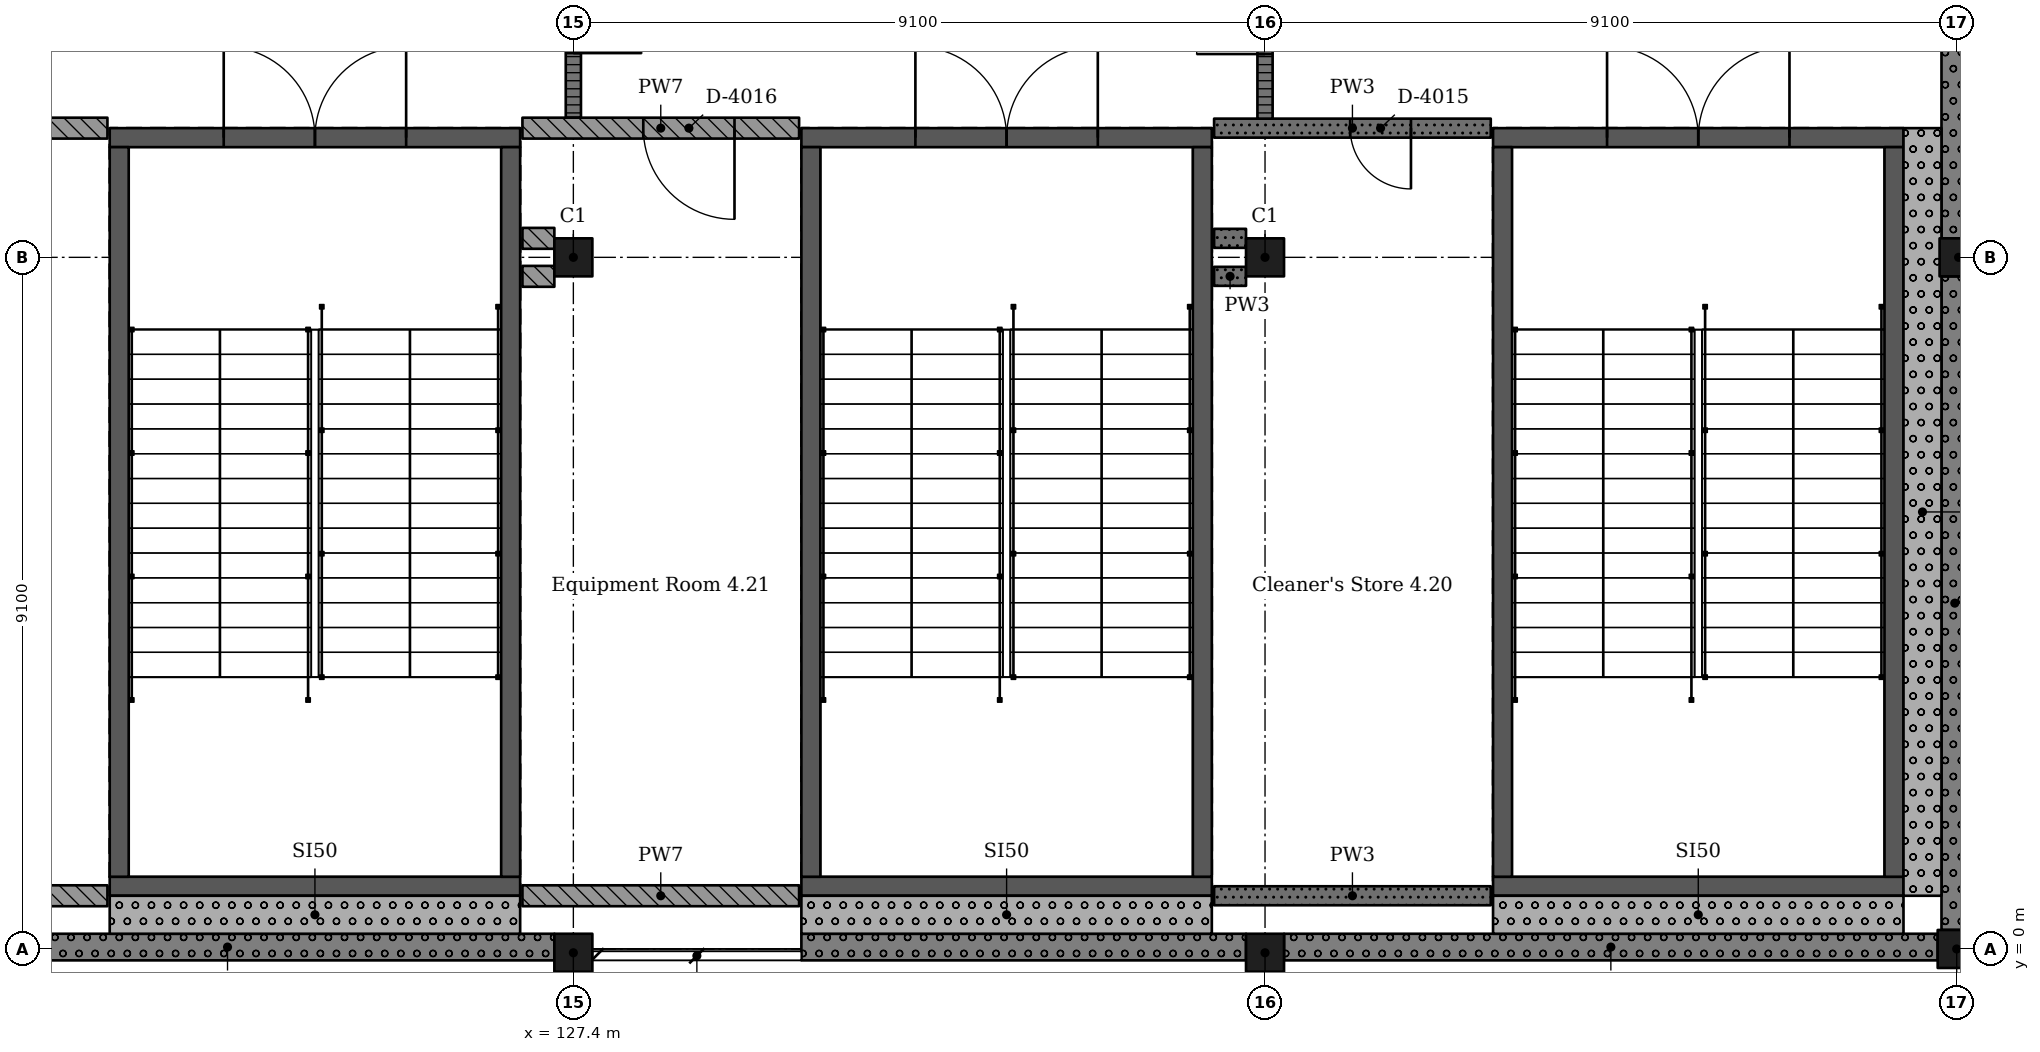
"""IFC4 building model, lengths in metres.
Left out: names, types, materials, properties, quantities, classifications, styles, units other than length and angle.
Written with IfcOpenShell. Run it as: python <this file> out.ifc"""

import sys

from ifc_helpers import new_model, si_unit, direction, frame, frame_2d, origin, origin_2d, place, context, subcontext, project, spatial, rectangle, extrude, element, fill, save


model = new_model("IFC4")
c1 = context("Model", 3, precision=1e-05, world=origin(), true_north=direction((0.0, 1.0)))
c2 = subcontext(c1, "Body", "Model", "MODEL_VIEW")
j1 = project(units=[si_unit("LENGTHUNIT", "METRE"), si_unit("PLANEANGLEUNIT", "RADIAN")], contexts=[c1])
p1 = place(None, origin())
s1 = spatial("IfcSite", under=j1, at=p1, CompositionType="ELEMENT")
p2 = place(p1, origin())
s2 = spatial("IfcBuilding", under=s1, at=p2, CompositionType="ELEMENT")
p3 = place(p2, frame((0.0, 0.0, 20.02)))
s3 = spatial("IfcBuildingStorey", under=s2, at=p3, CompositionType="ELEMENT", Elevation=20.02)
for number, where, z_axis, x_axis in (
    (1, (127.4, -0.05, 0.0), (0.0, 0.0, 1.0), (1.0, 0.0, 0.0)),
    (2, (127.4, 9.1, 0.0), (0.0, 0.0, 1.0), (1.0, 0.0, 0.0)),
    (3, (136.5, -0.05, 0.0), (0.0, 0.0, 1.0), (1.0, 0.0, 0.0)),
    (4, (136.5, 9.1, 0.0), (0.0, 0.0, 1.0), (1.0, 0.0, 0.0)),
    (5, (145.6, 0.0, 0.0), (0.0, 0.0, 1.0), (1.0, 0.0, 0.0)),
    (6, (145.625, 9.1, 0.0), (0.0, 0.0, 1.0), (1.0, 0.0, 0.0)),
):
    element("IfcColumn", number, at=place(p3, frame(where, z_axis=z_axis, x_axis=x_axis)), inside=s3, PredefinedType="COLUMN", context=c2, shape_type="SweptSolid", body=[
        extrude(rectangle(XDim=0.5, YDim=0.5, at=origin_2d()), origin(), (0.0, 0.0, 1.0), 4.55),
    ])
p4 = place(p3, frame((144.9, 0.825, 0.0), z_axis=(0.0, 0.0, 1.0), x_axis=(-1.0, 0.0, 0.0)))
e7 = element("IfcWall", 7, at=p4, inside=s3, PredefinedType="SHEAR", context=c2, shape_type="SweptSolid", body=[
    extrude(rectangle(XDim=5.4, YDim=0.25, at=frame_2d((2.7, 0.0))), origin(), (0.0, 0.0, 1.0), 4.55),
])
p5 = place(p3, frame((144.9, 10.675, 0.0), z_axis=(0.0, 0.0, 1.0), x_axis=(-1.0, 0.0, 0.0)))
e8 = element("IfcWall", 8, at=p5, inside=s3, PredefinedType="SHEAR", context=c2, shape_type="SweptSolid", body=[
    extrude(rectangle(XDim=5.4, YDim=0.25, at=frame_2d((2.7, 0.0))), origin(), (0.0, 0.0, 1.0), 4.55),
])
p6 = place(p5, frame((1.5, 0.0, 0.0)))
e9 = element("IfcOpeningElement", 9, at=p6, cuts=e8, PredefinedType="OPENING", context=c2, shape_type="SweptSolid", body=[
    extrude(rectangle(XDim=2.4, YDim=2.1, at=frame_2d((1.2, 1.05))), frame((0.0, 0.135, 0.0), z_axis=(0.0, -1.0, 0.0), x_axis=(1.0, 0.0, 0.0)), (0.0, 0.0, 1.0), 0.27),
])
for number, where, z_axis, x_axis in (
    (10, (139.625, 10.55, 0.0), (0.0, 0.0, 1.0), (0.0, -1.0, 0.0)),
    (11, (144.775, 10.55, 0.0), (0.0, 0.0, 1.0), (0.0, -1.0, 0.0)),
):
    element("IfcWall", number, at=place(p3, frame(where, z_axis=z_axis, x_axis=x_axis)), inside=s3, PredefinedType="SHEAR", context=c2, shape_type="SweptSolid", body=[
        extrude(rectangle(XDim=9.6, YDim=0.25, at=frame_2d((4.8, 0.0))), origin(), (0.0, 0.0, 1.0), 4.55),
    ])
p7 = place(p3, frame((135.8, 0.825, 0.0), z_axis=(0.0, 0.0, 1.0), x_axis=(-1.0, 0.0, 0.0)))
e12 = element("IfcWall", 12, at=p7, inside=s3, PredefinedType="SHEAR", context=c2, shape_type="SweptSolid", body=[
    extrude(rectangle(XDim=5.4, YDim=0.25, at=frame_2d((2.7, 0.0))), origin(), (0.0, 0.0, 1.0), 4.55),
])
p8 = place(p3, frame((135.8, 10.675, 0.0), z_axis=(0.0, 0.0, 1.0), x_axis=(-1.0, 0.0, 0.0)))
e13 = element("IfcWall", 13, at=p8, inside=s3, PredefinedType="SHEAR", context=c2, shape_type="SweptSolid", body=[
    extrude(rectangle(XDim=5.4, YDim=0.25, at=frame_2d((2.7, 0.0))), origin(), (0.0, 0.0, 1.0), 4.55),
])
p9 = place(p8, frame((1.5, 0.0, 0.0)))
e14 = element("IfcOpeningElement", 14, at=p9, cuts=e13, PredefinedType="OPENING", context=c2, shape_type="SweptSolid", body=[
    extrude(rectangle(XDim=2.4, YDim=2.1, at=frame_2d((1.2, 1.05))), frame((0.0, 0.135, 0.0), z_axis=(0.0, -1.0, 0.0), x_axis=(1.0, 0.0, 0.0)), (0.0, 0.0, 1.0), 0.27),
])
for number, where, z_axis, x_axis in (
    (15, (130.525, 10.55, 0.0), (0.0, 0.0, 1.0), (0.0, -1.0, 0.0)),
    (16, (135.675, 10.55, 0.0), (0.0, 0.0, 1.0), (0.0, -1.0, 0.0)),
):
    element("IfcWall", number, at=place(p3, frame(where, z_axis=z_axis, x_axis=x_axis)), inside=s3, PredefinedType="SHEAR", context=c2, shape_type="SweptSolid", body=[
        extrude(rectangle(XDim=9.6, YDim=0.25, at=frame_2d((4.8, 0.0))), origin(), (0.0, 0.0, 1.0), 4.55),
    ])
p10 = place(p3, frame((126.7, 0.825, 0.0), z_axis=(0.0, 0.0, 1.0), x_axis=(-1.0, 0.0, 0.0)))
e17 = element("IfcWall", 17, at=p10, inside=s3, PredefinedType="SHEAR", context=c2, shape_type="SweptSolid", body=[
    extrude(rectangle(XDim=5.4, YDim=0.25, at=frame_2d((2.7, 0.0))), origin(), (0.0, 0.0, 1.0), 4.55),
])
p11 = place(p3, frame((126.7, 10.675, 0.0), z_axis=(0.0, 0.0, 1.0), x_axis=(-1.0, 0.0, 0.0)))
e18 = element("IfcWall", 18, at=p11, inside=s3, PredefinedType="SHEAR", context=c2, shape_type="SweptSolid", body=[
    extrude(rectangle(XDim=5.4, YDim=0.25, at=frame_2d((2.7, 0.0))), origin(), (0.0, 0.0, 1.0), 4.55),
])
p12 = place(p11, frame((1.5, 0.0, 0.0)))
e19 = element("IfcOpeningElement", 19, at=p12, cuts=e18, PredefinedType="OPENING", context=c2, shape_type="SweptSolid", body=[
    extrude(rectangle(XDim=2.4, YDim=2.1, at=frame_2d((1.2, 1.05))), frame((0.0, 0.135, 0.0), z_axis=(0.0, -1.0, 0.0), x_axis=(1.0, 0.0, 0.0)), (0.0, 0.0, 1.0), 0.27),
])
for number, where, z_axis, x_axis in (
    (20, (121.425, 10.55, 0.0), (0.0, 0.0, 1.0), (0.0, -1.0, 0.0)),
    (21, (126.575, 10.55, 0.0), (0.0, 0.0, 1.0), (0.0, -1.0, 0.0)),
):
    element("IfcWall", number, at=place(p3, frame(where, z_axis=z_axis, x_axis=x_axis)), inside=s3, PredefinedType="SHEAR", context=c2, shape_type="SweptSolid", body=[
        extrude(rectangle(XDim=9.6, YDim=0.25, at=frame_2d((4.8, 0.0))), origin(), (0.0, 0.0, 1.0), 4.55),
    ])
p13 = place(p3, frame((118.55, 0.025, 0.0), z_axis=(0.0, 0.0, 1.0), x_axis=(1.0, 0.0, 0.0)))
e22 = element("IfcWall", 22, at=p13, inside=s3, PredefinedType="SOLIDWALL", context=c2, shape_type="SweptSolid", body=[
    extrude(rectangle(XDim=8.6, YDim=0.35, at=frame_2d((4.3, 0.0))), origin(), (0.0, 0.0, 1.0), 3.5),
])
p14 = place(p3, frame((130.4, 0.025, 0.0), z_axis=(0.0, 0.0, 1.0), x_axis=(1.0, 0.0, 0.0)))
e23 = element("IfcWall", 23, at=p14, inside=s3, PredefinedType="SOLIDWALL", context=c2, shape_type="SweptSolid", body=[
    extrude(rectangle(XDim=5.85, YDim=0.35, at=frame_2d((2.925, 0.0))), origin(), (0.0, 0.0, 1.0), 3.5),
])
for number, where, z_axis, x_axis in (
    (24, (136.75, 0.025, 0.0), (0.0, 0.0, 1.0), (1.0, 0.0, 0.0)),
    (25, (145.575, 0.25, 0.0), (0.0, 0.0, 1.0), (0.0, 1.0, 0.0)),
):
    element("IfcWall", number, at=place(p3, frame(where, z_axis=z_axis, x_axis=x_axis)), inside=s3, PredefinedType="SOLIDWALL", context=c2, shape_type="SweptSolid", body=[
        extrude(rectangle(XDim=8.6, YDim=0.35, at=frame_2d((4.3, 0.0))), origin(), (0.0, 0.0, 1.0), 3.5),
    ])
p15 = place(p3, frame((145.575, 9.35, 0.0), z_axis=(0.0, 0.0, 1.0), x_axis=(0.0, 1.0, 0.0)))
e26 = element("IfcWall", 26, at=p15, inside=s3, PredefinedType="SOLIDWALL", context=c2, shape_type="SweptSolid", body=[
    extrude(rectangle(XDim=8.6, YDim=0.35, at=frame_2d((4.3, 0.0))), origin(), (0.0, 0.0, 1.0), 3.5),
])
p16 = place(p3, frame((139.5, 0.45, 0.0), z_axis=(0.0, 0.0, 1.0), x_axis=(1.0, 0.0, 0.0)))
e27 = element("IfcWall", 27, at=p16, inside=s3, PredefinedType="SOLIDWALL", context=c2, shape_type="SweptSolid", body=[
    extrude(rectangle(XDim=5.4, YDim=0.5, at=frame_2d((2.7, 0.0))), origin(), (0.0, 0.0, 1.0), 4.25),
])
p17 = place(p3, frame((145.15, 0.7, 0.0), z_axis=(0.0, 0.0, 1.0), x_axis=(0.0, 1.0, 0.0)))
e28 = element("IfcWall", 28, at=p17, inside=s3, PredefinedType="SOLIDWALL", context=c2, shape_type="SweptSolid", body=[
    extrude(rectangle(XDim=10.1, YDim=0.5, at=frame_2d((5.05, 0.0))), origin(), (0.0, 0.0, 1.0), 4.55),
])
p18 = place(p3, frame((130.4, 0.45, 0.0), z_axis=(0.0, 0.0, 1.0), x_axis=(1.0, 0.0, 0.0)))
e29 = element("IfcWall", 29, at=p18, inside=s3, PredefinedType="SOLIDWALL", context=c2, shape_type="SweptSolid", body=[
    extrude(rectangle(XDim=5.4, YDim=0.5, at=frame_2d((2.7, 0.0))), origin(), (0.0, 0.0, 1.0), 4.25),
])
p19 = place(p3, frame((121.3, 0.45, 0.0), z_axis=(0.0, 0.0, 1.0), x_axis=(1.0, 0.0, 0.0)))
e30 = element("IfcWall", 30, at=p19, inside=s3, PredefinedType="SOLIDWALL", context=c2, shape_type="SweptSolid", body=[
    extrude(rectangle(XDim=5.4, YDim=0.5, at=frame_2d((2.7, 0.0))), origin(), (0.0, 0.0, 1.0), 4.25),
])
p20 = place(p3, frame((117.63, 10.8, 0.0), z_axis=(0.0, 0.0, 1.0), x_axis=(1.0, 0.0, 0.0)))
e31 = element("IfcWall", 31, at=p20, inside=s3, PredefinedType="SOLIDWALL", context=c2, shape_type="SweptSolid", body=[
    extrude(rectangle(XDim=3.64, YDim=0.275, at=frame_2d((1.82, 0.0))), origin(), (0.0, 0.0, 1.0), 4.25),
])
p21 = place(p20, frame((1.59, 0.0, 0.0)))
e32 = element("IfcOpeningElement", 32, at=p21, cuts=e31, PredefinedType="OPENING", context=c2, shape_type="SweptSolid", body=[
    extrude(rectangle(XDim=1.2, YDim=2.4, at=frame_2d((0.6, 1.2))), frame((0.0, 0.147, 0.0), z_axis=(0.0, -1.0, 0.0), x_axis=(1.0, 0.0, 0.0)), (0.0, 0.0, 1.0), 0.295),
])
p22 = place(p3, frame((121.27, 0.7, 0.0), z_axis=(0.0, 0.0, 1.0), x_axis=(-1.0, 0.0, 0.0)))
e33 = element("IfcWall", 33, at=p22, inside=s3, PredefinedType="SOLIDWALL", context=c2, shape_type="SweptSolid", body=[
    extrude(rectangle(XDim=3.64, YDim=0.275, at=frame_2d((1.82, 0.0))), origin(), (0.0, 0.0, 1.0), 4.25),
])
for number, where, z_axis, x_axis in (
    (34, (126.73, 8.85, 0.0), (0.0, 0.0, 1.0), (1.0, 0.0, 0.0)),
    (35, (127.15, 9.35, 0.0), (0.0, 0.0, 1.0), (-1.0, 0.0, 0.0)),
):
    element("IfcWall", number, at=place(p3, frame(where, z_axis=z_axis, x_axis=x_axis)), inside=s3, PredefinedType="SOLIDWALL", context=c2, shape_type="SweptSolid", body=[
        extrude(rectangle(XDim=0.42, YDim=0.275, at=frame_2d((0.21, 0.0))), origin(), (0.0, 0.0, 1.0), 4.25),
    ])
p23 = place(p3, frame((126.73, 10.8, 0.0), z_axis=(0.0, 0.0, 1.0), x_axis=(1.0, 0.0, 0.0)))
e36 = element("IfcWall", 36, at=p23, inside=s3, PredefinedType="SOLIDWALL", context=c2, shape_type="SweptSolid", body=[
    extrude(rectangle(XDim=3.64, YDim=0.275, at=frame_2d((1.82, 0.0))), origin(), (0.0, 0.0, 1.0), 4.25),
])
p24 = place(p23, frame((1.59, 0.0, 0.0)))
e37 = element("IfcOpeningElement", 37, at=p24, cuts=e36, PredefinedType="OPENING", context=c2, shape_type="SweptSolid", body=[
    extrude(rectangle(XDim=1.2, YDim=2.4, at=frame_2d((0.6, 1.2))), frame((0.0, 0.147, 0.0), z_axis=(0.0, -1.0, 0.0), x_axis=(1.0, 0.0, 0.0)), (0.0, 0.0, 1.0), 0.295),
])
p25 = place(p3, frame((127.4, 10.938, 0.0), z_axis=(0.0, 0.0, 1.0), x_axis=(0.0, 1.0, 0.0)))
e38 = element("IfcWall", 38, at=p25, inside=s3, PredefinedType="PARTITIONING", context=c2, shape_type="SweptSolid", body=[
    extrude(rectangle(XDim=6.962, YDim=0.2, at=frame_2d((3.481, 0.0))), origin(), (0.0, 0.0, 1.0), 3.5),
])
p26 = place(p25, frame((0.85, 0.0, 0.0)))
e39 = element("IfcOpeningElement", 39, at=p26, cuts=e38, PredefinedType="OPENING", context=c2, shape_type="SweptSolid", body=[
    extrude(rectangle(XDim=1.8, YDim=2.4, at=frame_2d((0.9, 1.2))), frame((0.0, 0.11, 0.0), z_axis=(0.0, -1.0, 0.0), x_axis=(1.0, 0.0, 0.0)), (0.0, 0.0, 1.0), 0.22),
])
p27 = place(p25, frame((4.35, 0.0, 0.0)))
e40 = element("IfcOpeningElement", 40, at=p27, cuts=e38, PredefinedType="OPENING", context=c2, shape_type="SweptSolid", body=[
    extrude(rectangle(XDim=1.8, YDim=2.4, at=frame_2d((0.9, 1.2))), frame((0.0, 0.11, 0.0), z_axis=(0.0, -1.0, 0.0), x_axis=(1.0, 0.0, 0.0)), (0.0, 0.0, 1.0), 0.22),
])
p28 = place(p3, frame((130.37, 0.7, 0.0), z_axis=(0.0, 0.0, 1.0), x_axis=(-1.0, 0.0, 0.0)))
e41 = element("IfcWall", 41, at=p28, inside=s3, PredefinedType="SOLIDWALL", context=c2, shape_type="SweptSolid", body=[
    extrude(rectangle(XDim=3.64, YDim=0.275, at=frame_2d((1.82, 0.0))), origin(), (0.0, 0.0, 1.0), 4.25),
])
for number, where, z_axis, x_axis in (
    (42, (135.83, 8.85, 0.0), (0.0, 0.0, 1.0), (1.0, 0.0, 0.0)),
    (43, (136.25, 9.35, 0.0), (0.0, 0.0, 1.0), (-1.0, 0.0, 0.0)),
):
    element("IfcWall", number, at=place(p3, frame(where, z_axis=z_axis, x_axis=x_axis)), inside=s3, PredefinedType="SOLIDWALL", context=c2, shape_type="SweptSolid", body=[
        extrude(rectangle(XDim=0.42, YDim=0.25, at=frame_2d((0.21, 0.0))), origin(), (0.0, 0.0, 1.0), 4.25),
    ])
p29 = place(p3, frame((135.83, 10.8, 0.0), z_axis=(0.0, 0.0, 1.0), x_axis=(1.0, 0.0, 0.0)))
e44 = element("IfcWall", 44, at=p29, inside=s3, PredefinedType="SOLIDWALL", context=c2, shape_type="SweptSolid", body=[
    extrude(rectangle(XDim=3.64, YDim=0.25, at=frame_2d((1.82, 0.0))), origin(), (0.0, 0.0, 1.0), 4.25),
])
p30 = place(p29, frame((1.79, 0.0, 0.0)))
e45 = element("IfcOpeningElement", 45, at=p30, cuts=e44, PredefinedType="OPENING", context=c2, shape_type="SweptSolid", body=[
    extrude(rectangle(XDim=0.8, YDim=2.1, at=frame_2d((0.4, 1.05))), frame((0.0, 0.135, 0.0), z_axis=(0.0, -1.0, 0.0), x_axis=(1.0, 0.0, 0.0)), (0.0, 0.0, 1.0), 0.27),
])
p31 = place(p3, frame((136.5, 10.925, 0.0), z_axis=(0.0, 0.0, 1.0), x_axis=(0.0, 1.0, 0.0)))
e46 = element("IfcWall", 46, at=p31, inside=s3, PredefinedType="PARTITIONING", context=c2, shape_type="SweptSolid", body=[
    extrude(rectangle(XDim=7.0, YDim=0.2, at=frame_2d((3.5, 0.0))), origin(), (0.0, 0.0, 1.0), 3.5),
])
p32 = place(p31, frame((0.85, 0.0, 0.0)))
e47 = element("IfcOpeningElement", 47, at=p32, cuts=e46, PredefinedType="OPENING", context=c2, shape_type="SweptSolid", body=[
    extrude(rectangle(XDim=1.8, YDim=2.4, at=frame_2d((0.9, 1.2))), frame((0.0, 0.11, 0.0), z_axis=(0.0, -1.0, 0.0), x_axis=(1.0, 0.0, 0.0)), (0.0, 0.0, 1.0), 0.22),
])
p33 = place(p31, frame((4.35, 0.0, 0.0)))
e48 = element("IfcOpeningElement", 48, at=p33, cuts=e46, PredefinedType="OPENING", context=c2, shape_type="SweptSolid", body=[
    extrude(rectangle(XDim=1.8, YDim=2.4, at=frame_2d((0.9, 1.2))), frame((0.0, 0.11, 0.0), z_axis=(0.0, -1.0, 0.0), x_axis=(1.0, 0.0, 0.0)), (0.0, 0.0, 1.0), 0.22),
])
p34 = place(p3, frame((139.47, 0.7, 0.0), z_axis=(0.0, 0.0, 1.0), x_axis=(-1.0, 0.0, 0.0)))
e49 = element("IfcWall", 49, at=p34, inside=s3, PredefinedType="SOLIDWALL", context=c2, shape_type="SweptSolid", body=[
    extrude(rectangle(XDim=3.64, YDim=0.25, at=frame_2d((1.82, 0.0))), origin(), (0.0, 0.0, 1.0), 4.25),
])
p35 = place(p30, origin())
e50 = element("IfcDoor", 50, at=p35, inside=s3, OperationType="SINGLE_SWING_RIGHT", PredefinedType="DOOR", context=c2, shape_type="SweptSolid", body=[
    extrude(rectangle(XDim=0.8, YDim=2.1, at=frame_2d((0.4, 1.05))), frame((0.0, 0.025, 0.0), z_axis=(0.0, -1.0, 0.0), x_axis=(1.0, 0.0, 0.0)), (0.0, 0.0, 1.0), 0.05),
])
fill(e45, e50)
p36 = place(p24, origin())
e51 = element("IfcDoor", 51, at=p36, inside=s3, OperationType="SINGLE_SWING_RIGHT", PredefinedType="DOOR", context=c2, shape_type="SweptSolid", body=[
    extrude(rectangle(XDim=1.2, YDim=2.4, at=frame_2d((0.6, 1.2))), frame((0.0, 0.025, 0.0), z_axis=(0.0, -1.0, 0.0), x_axis=(1.0, 0.0, 0.0)), (0.0, 0.0, 1.0), 0.05),
])
fill(e37, e51)
p37 = place(p32, origin())
e52 = element("IfcDoor", 52, at=p37, inside=s3, OperationType="DOUBLE_DOOR_SINGLE_SWING", PredefinedType="DOOR", context=c2, shape_type="SweptSolid", body=[
    extrude(rectangle(XDim=1.8, YDim=2.4, at=frame_2d((0.9, 1.2))), frame((0.0, 0.025, 0.0), z_axis=(0.0, -1.0, 0.0), x_axis=(1.0, 0.0, 0.0)), (0.0, 0.0, 1.0), 0.05),
])
fill(e47, e52)
p38 = place(p26, origin())
e53 = element("IfcDoor", 53, at=p38, inside=s3, OperationType="DOUBLE_DOOR_SINGLE_SWING", PredefinedType="DOOR", context=c2, shape_type="SweptSolid", body=[
    extrude(rectangle(XDim=1.8, YDim=2.4, at=frame_2d((0.9, 1.2))), frame((0.0, 0.025, 0.0), z_axis=(0.0, -1.0, 0.0), x_axis=(1.0, 0.0, 0.0)), (0.0, 0.0, 1.0), 0.05),
])
fill(e39, e53)
p39 = place(p6, origin())
e54 = element("IfcDoor", 54, at=p39, inside=s3, OperationType="DOUBLE_DOOR_SINGLE_SWING", PredefinedType="DOOR", context=c2, shape_type="SweptSolid", body=[
    extrude(rectangle(XDim=2.4, YDim=2.1, at=frame_2d((1.2, 1.05))), frame((0.0, 0.025, 0.0), z_axis=(0.0, -1.0, 0.0), x_axis=(1.0, 0.0, 0.0)), (0.0, 0.0, 1.0), 0.05),
])
fill(e9, e54)
p40 = place(p9, origin())
e55 = element("IfcDoor", 55, at=p40, inside=s3, OperationType="DOUBLE_DOOR_SINGLE_SWING", PredefinedType="DOOR", context=c2, shape_type="SweptSolid", body=[
    extrude(rectangle(XDim=2.4, YDim=2.1, at=frame_2d((1.2, 1.05))), frame((0.0, 0.025, 0.0), z_axis=(0.0, -1.0, 0.0), x_axis=(1.0, 0.0, 0.0)), (0.0, 0.0, 1.0), 0.05),
])
fill(e14, e55)
p41 = place(p12, origin())
e56 = element("IfcDoor", 56, at=p41, inside=s3, OperationType="DOUBLE_DOOR_SINGLE_SWING", PredefinedType="DOOR", context=c2, shape_type="SweptSolid", body=[
    extrude(rectangle(XDim=2.4, YDim=2.1, at=frame_2d((1.2, 1.05))), frame((0.0, 0.025, 0.0), z_axis=(0.0, -1.0, 0.0), x_axis=(1.0, 0.0, 0.0)), (0.0, 0.0, 1.0), 0.05),
])
fill(e19, e56)
save(model, sys.argv[1])
